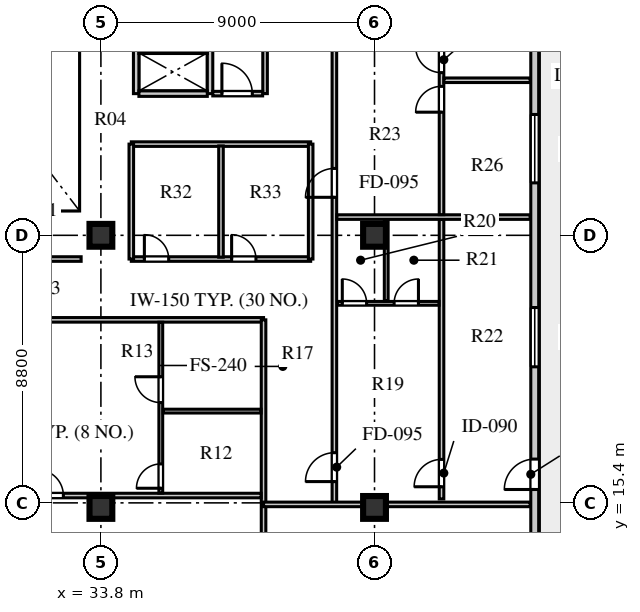
"""IFC4 building model, lengths in metres.
Left out: names, types, materials, properties, quantities, classifications, styles, units other than length and angle.
Written with IfcOpenShell. Run it as: python <this file> out.ifc"""

import sys

from ifc_helpers import new_model, si_unit, direction, frame, frame_2d, origin, origin_2d, place, context, subcontext, project, spatial, rectangle, extrude, element, fill, save


model = new_model("IFC4")
c1 = context("Model", 3, precision=1e-05, world=origin(), true_north=direction((0.0, 1.0)))
c2 = subcontext(c1, "Body", "Model", "MODEL_VIEW")
j1 = project(units=[si_unit("LENGTHUNIT", "METRE"), si_unit("PLANEANGLEUNIT", "RADIAN")], contexts=[c1])
p1 = place(None, origin())
s1 = spatial("IfcSite", under=j1, at=p1, CompositionType="ELEMENT")
p2 = place(p1, origin())
s2 = spatial("IfcBuilding", under=s1, at=p2, CompositionType="ELEMENT")
p3 = place(p2, frame((0.0, 0.0, 312.5)))
s3 = spatial("IfcBuildingStorey", under=s2, at=p3, CompositionType="ELEMENT", Elevation=312.5)
for number, where, z_axis, x_axis in (
    (1, (33.8, 15.25, 0.0), (0.0, 0.0, 1.0), (1.0, 0.0, 0.0)),
    (2, (33.8, 24.2, 0.0), (0.0, 0.0, 1.0), (1.0, 0.0, 0.0)),
    (3, (42.8, 15.25, 0.0), (0.0, 0.0, 1.0), (1.0, 0.0, 0.0)),
    (4, (42.8, 24.2, 0.0), (0.0, 0.0, 1.0), (1.0, 0.0, 0.0)),
):
    element("IfcColumn", number, at=place(p3, frame(where, z_axis=z_axis, x_axis=x_axis)), inside=s3, PredefinedType="COLUMN", context=c2, shape_type="SweptSolid", body=[
        extrude(rectangle(XDim=0.75, YDim=0.75, at=origin_2d()), origin(), (0.0, 0.0, 1.0), 3.56),
    ])
p4 = place(p3, frame((48.07, 13.41, 0.0), z_axis=(0.0, 0.0, 1.0), x_axis=(0.0, 1.0, 0.0)))
e5 = element("IfcWall", 5, at=p4, inside=s3, PredefinedType="SOLIDWALL", context=c2, shape_type="SweptSolid", body=[
    extrude(rectangle(XDim=30.38, YDim=0.26, at=frame_2d((15.19, 0.0))), origin(), (0.0, 0.0, 1.0), 3.56),
])
p5 = place(p4, frame((2.43, 0.0, 0.0)))
e6 = element("IfcOpeningElement", 6, at=p5, cuts=e5, PredefinedType="OPENING", context=c2, shape_type="SweptSolid", body=[
    extrude(rectangle(XDim=1.0, YDim=2.05, at=frame_2d((0.5, 1.025))), frame((0.0, 0.14, 0.0), z_axis=(0.0, -1.0, 0.0), x_axis=(1.0, 0.0, 0.0)), (0.0, 0.0, 1.0), 0.28),
])
p6 = place(p4, frame((6.465, 0.0, 0.8)))
e7 = element("IfcOpeningElement", 7, at=p6, cuts=e5, PredefinedType="OPENING", context=c2, shape_type="SweptSolid", body=[
    extrude(rectangle(XDim=1.95, YDim=2.0, at=frame_2d((0.975, 1.0))), frame((0.0, 0.14, 0.0), z_axis=(0.0, -1.0, 0.0), x_axis=(1.0, 0.0, 0.0)), (0.0, 0.0, 1.0), 0.28),
])
p7 = place(p4, frame((12.515, 0.0, 0.8)))
e8 = element("IfcOpeningElement", 8, at=p7, cuts=e5, PredefinedType="OPENING", context=c2, shape_type="SweptSolid", body=[
    extrude(rectangle(XDim=2.25, YDim=2.0, at=frame_2d((1.125, 1.0))), frame((0.0, 0.14, 0.0), z_axis=(0.0, -1.0, 0.0), x_axis=(1.0, 0.0, 0.0)), (0.0, 0.0, 1.0), 0.28),
])
p8 = place(p4, frame((17.24, 0.0, 0.8)))
e9 = element("IfcOpeningElement", 9, at=p8, cuts=e5, PredefinedType="OPENING", context=c2, shape_type="SweptSolid", body=[
    extrude(rectangle(XDim=1.8, YDim=2.0, at=frame_2d((0.9, 1.0))), frame((0.0, 0.14, 0.0), z_axis=(0.0, -1.0, 0.0), x_axis=(1.0, 0.0, 0.0)), (0.0, 0.0, 1.0), 0.28),
])
p9 = place(p4, frame((23.665, 0.0, 0.8)))
e10 = element("IfcOpeningElement", 10, at=p9, cuts=e5, PredefinedType="OPENING", context=c2, shape_type="SweptSolid", body=[
    extrude(rectangle(XDim=1.5, YDim=2.0, at=frame_2d((0.75, 1.0))), frame((0.0, 0.14, 0.0), z_axis=(0.0, -1.0, 0.0), x_axis=(1.0, 0.0, 0.0)), (0.0, 0.0, 1.0), 0.28),
])
p10 = place(p3, frame((34.96, 28.86, 0.0), z_axis=(0.0, 0.0, 1.0), x_axis=(0.0, 1.0, 0.0)))
e11 = element("IfcWall", 11, at=p10, inside=s3, PredefinedType="SOLIDWALL", context=c2, shape_type="SweptSolid", body=[
    extrude(rectangle(XDim=4.22, YDim=0.18, at=frame_2d((2.11, 0.0))), origin(), (0.0, 0.0, 1.0), 3.56),
])
p11 = place(p3, frame((37.39, 28.86, 0.0), z_axis=(0.0, 0.0, 1.0), x_axis=(0.0, 1.0, 0.0)))
e12 = element("IfcWall", 12, at=p11, inside=s3, PredefinedType="SOLIDWALL", context=c2, shape_type="SweptSolid", body=[
    extrude(rectangle(XDim=4.22, YDim=0.18, at=frame_2d((2.11, 0.0))), origin(), (0.0, 0.0, 1.0), 3.56),
])
p12 = place(p11, frame((2.1, 0.0, 0.0)))
e13 = element("IfcOpeningElement", 13, at=p12, cuts=e12, PredefinedType="OPENING", context=c2, shape_type="SweptSolid", body=[
    extrude(rectangle(XDim=1.2, YDim=2.12, at=frame_2d((0.6, 1.06))), frame((0.0, 0.1, 0.0), z_axis=(0.0, -1.0, 0.0), x_axis=(1.0, 0.0, 0.0)), (0.0, 0.0, 1.0), 0.2),
])
for number, where, z_axis, x_axis in (
    (14, (35.05, 28.86, 0.0), (0.0, 0.0, 1.0), (1.0, 0.0, 0.0)),
    (15, (35.05, 30.27, 0.0), (0.0, 0.0, 1.0), (1.0, 0.0, 0.0)),
):
    element("IfcWall", number, at=place(p3, frame(where, z_axis=z_axis, x_axis=x_axis)), inside=s3, PredefinedType="SOLIDWALL", context=c2, shape_type="SweptSolid", body=[
        extrude(rectangle(XDim=2.25, YDim=0.18, at=frame_2d((1.125, 0.0))), origin(), (0.0, 0.0, 1.0), 3.56),
    ])
p13 = place(p3, frame((39.2, 28.86, 0.0), z_axis=(0.0, 0.0, 1.0), x_axis=(0.0, 1.0, 0.0)))
e16 = element("IfcWall", 16, at=p13, inside=s3, PredefinedType="PARTITIONING", context=c2, shape_type="SweptSolid", body=[
    extrude(rectangle(XDim=4.22, YDim=0.15, at=frame_2d((2.11, 0.0))), origin(), (0.0, 0.0, 1.0), 3.56),
])
p14 = place(p3, frame((37.48, 28.86, 0.0), z_axis=(0.0, 0.0, 1.0), x_axis=(1.0, 0.0, 0.0)))
e17 = element("IfcWall", 17, at=p14, inside=s3, PredefinedType="PARTITIONING", context=c2, shape_type="SweptSolid", body=[
    extrude(rectangle(XDim=1.64, YDim=0.15, at=frame_2d((0.82, 0.0))), origin(), (0.0, 0.0, 1.0), 3.56),
])
p15 = place(p14, frame((0.3, 0.0, 0.0)))
e18 = element("IfcOpeningElement", 18, at=p15, cuts=e17, PredefinedType="OPENING", context=c2, shape_type="SweptSolid", body=[
    extrude(rectangle(XDim=1.0, YDim=2.1, at=frame_2d((0.5, 1.05))), frame((0.0, 0.085, 0.0), z_axis=(0.0, -1.0, 0.0), x_axis=(1.0, 0.0, 0.0)), (0.0, 0.0, 1.0), 0.17),
])
p16 = place(p3, frame((27.08, 21.42, 0.0), z_axis=(0.0, 0.0, 1.0), x_axis=(1.0, 0.0, 0.0)))
e19 = element("IfcWall", 19, at=p16, inside=s3, PredefinedType="PARTITIONING", context=c2, shape_type="SweptSolid", body=[
    extrude(rectangle(XDim=12.07, YDim=0.15, at=frame_2d((6.035, 0.0))), origin(), (0.0, 0.0, 1.0), 3.26),
])
p17 = place(p16, frame((0.63, 0.0, 0.0)))
e20 = element("IfcOpeningElement", 20, at=p17, cuts=e19, PredefinedType="OPENING", context=c2, shape_type="SweptSolid", body=[
    extrude(rectangle(XDim=0.95, YDim=2.1, at=frame_2d((0.475, 1.05))), frame((0.0, 0.085, 0.0), z_axis=(0.0, -1.0, 0.0), x_axis=(1.0, 0.0, 0.0)), (0.0, 0.0, 1.0), 0.17),
])
p18 = place(p3, frame((27.15, 23.42, 0.0), z_axis=(0.0, 0.0, 1.0), x_axis=(1.0, 0.0, 0.0)))
e21 = element("IfcWall", 21, at=p18, inside=s3, PredefinedType="PARTITIONING", context=c2, shape_type="SweptSolid", body=[
    extrude(rectangle(XDim=6.0, YDim=0.15, at=frame_2d((3.0, 0.0))), origin(), (0.0, 0.0, 1.0), 3.56),
])
p19 = place(p3, frame((39.15, 10.38, 0.0), z_axis=(0.0, 0.0, 1.0), x_axis=(0.0, 1.0, 0.0)))
e22 = element("IfcWall", 22, at=p19, inside=s3, PredefinedType="PARTITIONING", context=c2, shape_type="SweptSolid", body=[
    extrude(rectangle(XDim=11.04, YDim=0.15, at=frame_2d((5.52, 0.0))), origin(), (0.0, 0.0, 1.0), 3.56),
])
p20 = place(p3, frame((27.24, 15.641, 0.0), z_axis=(0.0, 0.0, 1.0), x_axis=(1.0, 0.0, 0.0)))
e23 = element("IfcWall", 23, at=p20, inside=s3, PredefinedType="PARTITIONING", context=c2, shape_type="SweptSolid", body=[
    extrude(rectangle(XDim=11.83, YDim=0.15, at=frame_2d((5.915, 0.0))), origin(), (0.0, 0.0, 1.0), 3.56),
])
p21 = place(p20, frame((0.3, 0.0, 0.0)))
e24 = element("IfcOpeningElement", 24, at=p21, cuts=e23, PredefinedType="OPENING", context=c2, shape_type="SweptSolid", body=[
    extrude(rectangle(XDim=0.85, YDim=2.08, at=frame_2d((0.425, 1.04))), frame((0.0, 0.085, 0.0), z_axis=(0.0, -1.0, 0.0), x_axis=(1.0, 0.0, 0.0)), (0.0, 0.0, 1.0), 0.17),
])
p22 = place(p20, frame((4.475, 0.0, 0.0)))
e25 = element("IfcOpeningElement", 25, at=p22, cuts=e23, PredefinedType="OPENING", context=c2, shape_type="SweptSolid", body=[
    extrude(rectangle(XDim=0.85, YDim=2.08, at=frame_2d((0.425, 1.04))), frame((0.0, 0.085, 0.0), z_axis=(0.0, -1.0, 0.0), x_axis=(1.0, 0.0, 0.0)), (0.0, 0.0, 1.0), 0.17),
])
p23 = place(p3, frame((35.77, 15.721, 0.0), z_axis=(0.0, 0.0, 1.0), x_axis=(0.0, 1.0, 0.0)))
e26 = element("IfcWall", 26, at=p23, inside=s3, PredefinedType="PLUMBINGWALL", context=c2, shape_type="SweptSolid", body=[
    extrude(rectangle(XDim=5.619, YDim=0.125, at=frame_2d((2.81, 0.0))), origin(), (0.0, 0.0, 1.0), 3.56),
])
p24 = place(p23, frame((0.16, 0.0, 0.0)))
e27 = element("IfcOpeningElement", 27, at=p24, cuts=e26, PredefinedType="OPENING", context=c2, shape_type="SweptSolid", body=[
    extrude(rectangle(XDim=0.8, YDim=2.05, at=frame_2d((0.4, 1.025))), frame((0.0, 0.073, 0.0), z_axis=(0.0, -1.0, 0.0), x_axis=(1.0, 0.0, 0.0)), (0.0, 0.0, 1.0), 0.145),
])
p25 = place(p23, frame((2.977, 0.0, 0.0)))
e28 = element("IfcOpeningElement", 28, at=p25, cuts=e26, PredefinedType="OPENING", context=c2, shape_type="SweptSolid", body=[
    extrude(rectangle(XDim=0.85, YDim=2.08, at=frame_2d((0.425, 1.04))), frame((0.0, 0.073, 0.0), z_axis=(0.0, -1.0, 0.0), x_axis=(1.0, 0.0, 0.0)), (0.0, 0.0, 1.0), 0.145),
])
p26 = place(p3, frame((35.85, 18.418, 0.0), z_axis=(0.0, 0.0, 1.0), x_axis=(1.0, 0.0, 0.0)))
e29 = element("IfcWall", 29, at=p26, inside=s3, PredefinedType="PLUMBINGWALL", context=c2, shape_type="SweptSolid", body=[
    extrude(rectangle(XDim=3.22, YDim=0.125, at=frame_2d((1.61, 0.0))), origin(), (0.0, 0.0, 1.0), 3.26),
])
p27 = place(p3, frame((41.48, 15.35, 0.0), z_axis=(0.0, 0.0, 1.0), x_axis=(0.0, 1.0, 0.0)))
e30 = element("IfcWall", 30, at=p27, inside=s3, PredefinedType="PARTITIONING", context=c2, shape_type="SweptSolid", body=[
    extrude(rectangle(XDim=26.5, YDim=0.15, at=frame_2d((13.25, 0.0))), origin(), (0.0, 0.0, 1.0), 3.56),
])
p28 = place(p27, frame((0.75, 0.0, 0.0)))
e31 = element("IfcOpeningElement", 31, at=p28, cuts=e30, PredefinedType="OPENING", context=c2, shape_type="SweptSolid", body=[
    extrude(rectangle(XDim=0.95, YDim=2.1, at=frame_2d((0.475, 1.05))), frame((0.0, 0.085, 0.0), z_axis=(0.0, -1.0, 0.0), x_axis=(1.0, 0.0, 0.0)), (0.0, 0.0, 1.0), 0.17),
])
p29 = place(p27, frame((10.1, 0.0, 0.0)))
e32 = element("IfcOpeningElement", 32, at=p29, cuts=e30, PredefinedType="OPENING", context=c2, shape_type="SweptSolid", body=[
    extrude(rectangle(XDim=0.95, YDim=2.1, at=frame_2d((0.475, 1.05))), frame((0.0, 0.085, 0.0), z_axis=(0.0, -1.0, 0.0), x_axis=(1.0, 0.0, 0.0)), (0.0, 0.0, 1.0), 0.17),
])
p30 = place(p27, frame((19.1, 0.0, 0.0)))
e33 = element("IfcOpeningElement", 33, at=p30, cuts=e30, PredefinedType="OPENING", context=c2, shape_type="SweptSolid", body=[
    extrude(rectangle(XDim=0.95, YDim=2.1, at=frame_2d((0.475, 1.05))), frame((0.0, 0.085, 0.0), z_axis=(0.0, -1.0, 0.0), x_axis=(1.0, 0.0, 0.0)), (0.0, 0.0, 1.0), 0.17),
])
p31 = place(p3, frame((39.15, 15.35, 0.0), z_axis=(0.0, 0.0, 1.0), x_axis=(1.0, 0.0, 0.0)))
e34 = element("IfcWall", 34, at=p31, inside=s3, PredefinedType="PARTITIONING", context=c2, shape_type="SweptSolid", body=[
    extrude(rectangle(XDim=8.77, YDim=0.15, at=frame_2d((4.385, 0.0))), origin(), (0.0, 0.0, 1.0), 2.96),
])
p32 = place(p3, frame((45.004, 15.53, 0.0), z_axis=(0.0, 0.0, 1.0), x_axis=(0.0, 1.0, 0.0)))
e35 = element("IfcWall", 35, at=p32, inside=s3, PredefinedType="PARTITIONING", context=c2, shape_type="SweptSolid", body=[
    extrude(rectangle(XDim=9.19, YDim=0.15, at=frame_2d((4.595, 0.0))), origin(), (0.0, 0.0, 1.0), 3.56),
])
p33 = place(p32, frame((0.4, 0.0, 0.0)))
e36 = element("IfcOpeningElement", 36, at=p33, cuts=e35, PredefinedType="OPENING", context=c2, shape_type="SweptSolid", body=[
    extrude(rectangle(XDim=0.9, YDim=2.08, at=frame_2d((0.45, 1.04))), frame((0.0, 0.085, 0.0), z_axis=(0.0, -1.0, 0.0), x_axis=(1.0, 0.0, 0.0)), (0.0, 0.0, 1.0), 0.17),
])
p34 = place(p3, frame((41.58, 21.963, 0.0), z_axis=(0.0, 0.0, 1.0), x_axis=(1.0, 0.0, 0.0)))
e37 = element("IfcWall", 37, at=p34, inside=s3, PredefinedType="PLUMBINGWALL", context=c2, shape_type="SweptSolid", body=[
    extrude(rectangle(XDim=3.344, YDim=0.125, at=frame_2d((1.672, 0.0))), origin(), (0.0, 0.0, 1.0), 3.56),
])
p35 = place(p34, frame((0.16, 0.0, 0.0)))
e38 = element("IfcOpeningElement", 38, at=p35, cuts=e37, PredefinedType="OPENING", context=c2, shape_type="SweptSolid", body=[
    extrude(rectangle(XDim=0.8, YDim=2.05, at=frame_2d((0.4, 1.025))), frame((0.0, 0.073, 0.0), z_axis=(0.0, -1.0, 0.0), x_axis=(1.0, 0.0, 0.0)), (0.0, 0.0, 1.0), 0.145),
])
p36 = place(p34, frame((1.865, 0.0, 0.0)))
e39 = element("IfcOpeningElement", 39, at=p36, cuts=e37, PredefinedType="OPENING", context=c2, shape_type="SweptSolid", body=[
    extrude(rectangle(XDim=0.8, YDim=2.05, at=frame_2d((0.4, 1.025))), frame((0.0, 0.073, 0.0), z_axis=(0.0, -1.0, 0.0), x_axis=(1.0, 0.0, 0.0)), (0.0, 0.0, 1.0), 0.145),
])
p37 = place(p3, frame((43.185, 22.043, 0.0), z_axis=(0.0, 0.0, 1.0), x_axis=(0.0, 1.0, 0.0)))
e40 = element("IfcWall", 40, at=p37, inside=s3, PredefinedType="PLUMBINGWALL", context=c2, shape_type="SweptSolid", body=[
    extrude(rectangle(XDim=2.677, YDim=0.125, at=frame_2d((1.338, 0.0))), origin(), (0.0, 0.0, 1.0), 3.56),
])
p38 = place(p3, frame((41.56, 24.8, 0.0), z_axis=(0.0, 0.0, 1.0), x_axis=(1.0, 0.0, 0.0)))
e41 = element("IfcWall", 41, at=p38, inside=s3, PredefinedType="PARTITIONING", context=c2, shape_type="SweptSolid", body=[
    extrude(rectangle(XDim=6.36, YDim=0.15, at=frame_2d((3.18, 0.0))), origin(), (0.0, 0.0, 1.0), 3.56),
])
p39 = place(p3, frame((45.004, 24.88, 0.0), z_axis=(0.0, 0.0, 1.0), x_axis=(0.0, 1.0, 0.0)))
e42 = element("IfcWall", 42, at=p39, inside=s3, PredefinedType="PARTITIONING", context=c2, shape_type="SweptSolid", body=[
    extrude(rectangle(XDim=8.84, YDim=0.15, at=frame_2d((4.42, 0.0))), origin(), (0.0, 0.0, 1.0), 3.56),
])
p40 = place(p39, frame((3.37, 0.0, 0.0)))
e43 = element("IfcOpeningElement", 43, at=p40, cuts=e42, PredefinedType="OPENING", context=c2, shape_type="SweptSolid", body=[
    extrude(rectangle(XDim=0.85, YDim=2.08, at=frame_2d((0.425, 1.04))), frame((0.0, 0.085, 0.0), z_axis=(0.0, -1.0, 0.0), x_axis=(1.0, 0.0, 0.0)), (0.0, 0.0, 1.0), 0.17),
])
p41 = place(p39, frame((4.67, 0.0, 0.0)))
e44 = element("IfcOpeningElement", 44, at=p41, cuts=e42, PredefinedType="OPENING", context=c2, shape_type="SweptSolid", body=[
    extrude(rectangle(XDim=0.85, YDim=2.08, at=frame_2d((0.425, 1.04))), frame((0.0, 0.085, 0.0), z_axis=(0.0, -1.0, 0.0), x_axis=(1.0, 0.0, 0.0)), (0.0, 0.0, 1.0), 0.17),
])
p42 = place(p3, frame((45.084, 29.3, 0.0), z_axis=(0.0, 0.0, 1.0), x_axis=(1.0, 0.0, 0.0)))
e45 = element("IfcWall", 45, at=p42, inside=s3, PredefinedType="PARTITIONING", context=c2, shape_type="SweptSolid", body=[
    extrude(rectangle(XDim=2.836, YDim=0.15, at=frame_2d((1.418, 0.0))), origin(), (0.0, 0.0, 1.0), 3.56),
])
p43 = place(p3, frame((34.8, 23.42, 0.0), z_axis=(0.0, 0.0, 1.0), x_axis=(1.0, 0.0, 0.0)))
e46 = element("IfcWall", 46, at=p43, inside=s3, PredefinedType="PARTITIONING", context=c2, shape_type="SweptSolid", body=[
    extrude(rectangle(XDim=5.9, YDim=0.15, at=frame_2d((2.95, 0.0))), origin(), (0.0, 0.0, 1.0), 3.56),
])
p44 = place(p43, frame((0.43, 0.0, 0.0)))
e47 = element("IfcOpeningElement", 47, at=p44, cuts=e46, PredefinedType="OPENING", context=c2, shape_type="SweptSolid", body=[
    extrude(rectangle(XDim=0.8, YDim=2.05, at=frame_2d((0.4, 1.025))), frame((0.0, 0.085, 0.0), z_axis=(0.0, -1.0, 0.0), x_axis=(1.0, 0.0, 0.0)), (0.0, 0.0, 1.0), 0.17),
])
p45 = place(p43, frame((3.3, 0.0, 0.0)))
e48 = element("IfcOpeningElement", 48, at=p45, cuts=e46, PredefinedType="OPENING", context=c2, shape_type="SweptSolid", body=[
    extrude(rectangle(XDim=0.8, YDim=2.05, at=frame_2d((0.4, 1.025))), frame((0.0, 0.085, 0.0), z_axis=(0.0, -1.0, 0.0), x_axis=(1.0, 0.0, 0.0)), (0.0, 0.0, 1.0), 0.17),
])
p46 = place(p3, frame((34.8, 27.2, 0.0), z_axis=(0.0, 0.0, 1.0), x_axis=(1.0, 0.0, 0.0)))
e49 = element("IfcWall", 49, at=p46, inside=s3, PredefinedType="PARTITIONING", context=c2, shape_type="SweptSolid", body=[
    extrude(rectangle(XDim=5.9, YDim=0.15, at=frame_2d((2.95, 0.0))), origin(), (0.0, 0.0, 1.0), 3.26),
])
for number, where, z_axis, x_axis in (
    (50, (34.8, 23.42, 0.0), (0.0, 0.0, 1.0), (0.0, 1.0, 0.0)),
    (51, (40.7, 23.42, 0.0), (0.0, 0.0, 1.0), (0.0, 1.0, 0.0)),
):
    element("IfcWall", number, at=place(p3, frame(where, z_axis=z_axis, x_axis=x_axis)), inside=s3, PredefinedType="PARTITIONING", context=c2, shape_type="SweptSolid", body=[
        extrude(rectangle(XDim=3.78, YDim=0.15, at=frame_2d((1.89, 0.0))), origin(), (0.0, 0.0, 1.0), 3.56),
    ])
p47 = place(p3, frame((37.75, 23.48, 0.0), z_axis=(0.0, 0.0, 1.0), x_axis=(0.0, 1.0, 0.0)))
e52 = element("IfcWall", 52, at=p47, inside=s3, PredefinedType="PARTITIONING", context=c2, shape_type="SweptSolid", body=[
    extrude(rectangle(XDim=3.66, YDim=0.15, at=frame_2d((1.83, 0.0))), origin(), (0.0, 0.0, 1.0), 3.56),
])
p48 = place(p5, frame((1.0, 0.0, 0.0), z_axis=(0.0, 0.0, 1.0), x_axis=(-1.0, 0.0, 0.0)))
e53 = element("IfcDoor", 53, at=p48, inside=s3, OperationType="SINGLE_SWING_RIGHT", PredefinedType="DOOR", context=c2, shape_type="SweptSolid", body=[
    extrude(rectangle(XDim=1.0, YDim=2.05, at=frame_2d((0.5, 1.025))), frame((0.0, 0.025, 0.0), z_axis=(0.0, -1.0, 0.0), x_axis=(1.0, 0.0, 0.0)), (0.0, 0.0, 1.0), 0.05),
])
fill(e6, e53)
p49 = place(p6, origin())
e54 = element("IfcWindow", 54, at=p49, inside=s3, PartitioningType="SINGLE_PANEL", PredefinedType="WINDOW", context=c2, shape_type="SweptSolid", body=[
    extrude(rectangle(XDim=1.95, YDim=2.0, at=frame_2d((0.975, 1.0))), frame((0.0, 0.03, 0.0), z_axis=(0.0, -1.0, 0.0), x_axis=(1.0, 0.0, 0.0)), (0.0, 0.0, 1.0), 0.06),
])
fill(e7, e54)
p50 = place(p7, origin())
e55 = element("IfcWindow", 55, at=p50, inside=s3, PartitioningType="SINGLE_PANEL", PredefinedType="WINDOW", context=c2, shape_type="SweptSolid", body=[
    extrude(rectangle(XDim=2.25, YDim=2.0, at=frame_2d((1.125, 1.0))), frame((0.0, 0.03, 0.0), z_axis=(0.0, -1.0, 0.0), x_axis=(1.0, 0.0, 0.0)), (0.0, 0.0, 1.0), 0.06),
])
fill(e8, e55)
p51 = place(p15, origin())
e56 = element("IfcDoor", 56, at=p51, inside=s3, OperationType="SINGLE_SWING_LEFT", PredefinedType="DOOR", context=c2, shape_type="SweptSolid", body=[
    extrude(rectangle(XDim=1.0, YDim=2.1, at=frame_2d((0.5, 1.05))), frame((0.0, 0.025, 0.0), z_axis=(0.0, -1.0, 0.0), x_axis=(1.0, 0.0, 0.0)), (0.0, 0.0, 1.0), 0.05),
])
fill(e18, e56)
p52 = place(p24, origin())
e57 = element("IfcDoor", 57, at=p52, inside=s3, OperationType="SINGLE_SWING_LEFT", PredefinedType="DOOR", context=c2, shape_type="SweptSolid", body=[
    extrude(rectangle(XDim=0.8, YDim=2.05, at=frame_2d((0.4, 1.025))), frame((0.0, 0.025, 0.0), z_axis=(0.0, -1.0, 0.0), x_axis=(1.0, 0.0, 0.0)), (0.0, 0.0, 1.0), 0.05),
])
fill(e27, e57)
p53 = place(p25, origin())
e58 = element("IfcDoor", 58, at=p53, inside=s3, OperationType="SINGLE_SWING_RIGHT", PredefinedType="DOOR", context=c2, shape_type="SweptSolid", body=[
    extrude(rectangle(XDim=0.85, YDim=2.08, at=frame_2d((0.425, 1.04))), frame((0.0, 0.025, 0.0), z_axis=(0.0, -1.0, 0.0), x_axis=(1.0, 0.0, 0.0)), (0.0, 0.0, 1.0), 0.05),
])
fill(e28, e58)
p54 = place(p22, frame((0.85, 0.0, 0.0), z_axis=(0.0, 0.0, 1.0), x_axis=(-1.0, 0.0, 0.0)))
e59 = element("IfcDoor", 59, at=p54, inside=s3, OperationType="SINGLE_SWING_RIGHT", PredefinedType="DOOR", context=c2, shape_type="SweptSolid", body=[
    extrude(rectangle(XDim=0.85, YDim=2.08, at=frame_2d((0.425, 1.04))), frame((0.0, 0.025, 0.0), z_axis=(0.0, -1.0, 0.0), x_axis=(1.0, 0.0, 0.0)), (0.0, 0.0, 1.0), 0.05),
])
fill(e25, e59)
p55 = place(p35, origin())
e60 = element("IfcDoor", 60, at=p55, inside=s3, OperationType="SINGLE_SWING_LEFT", PredefinedType="DOOR", context=c2, shape_type="SweptSolid", body=[
    extrude(rectangle(XDim=0.8, YDim=2.05, at=frame_2d((0.4, 1.025))), frame((0.0, 0.025, 0.0), z_axis=(0.0, -1.0, 0.0), x_axis=(1.0, 0.0, 0.0)), (0.0, 0.0, 1.0), 0.05),
])
fill(e38, e60)
p56 = place(p36, origin())
e61 = element("IfcDoor", 61, at=p56, inside=s3, OperationType="SINGLE_SWING_RIGHT", PredefinedType="DOOR", context=c2, shape_type="SweptSolid", body=[
    extrude(rectangle(XDim=0.8, YDim=2.05, at=frame_2d((0.4, 1.025))), frame((0.0, 0.025, 0.0), z_axis=(0.0, -1.0, 0.0), x_axis=(1.0, 0.0, 0.0)), (0.0, 0.0, 1.0), 0.05),
])
fill(e39, e61)
p57 = place(p33, origin())
e62 = element("IfcDoor", 62, at=p57, inside=s3, OperationType="SINGLE_SWING_LEFT", PredefinedType="DOOR", context=c2, shape_type="SweptSolid", body=[
    extrude(rectangle(XDim=0.9, YDim=2.08, at=frame_2d((0.45, 1.04))), frame((0.0, 0.025, 0.0), z_axis=(0.0, -1.0, 0.0), x_axis=(1.0, 0.0, 0.0)), (0.0, 0.0, 1.0), 0.05),
])
fill(e36, e62)
p58 = place(p28, origin())
e63 = element("IfcDoor", 63, at=p58, inside=s3, OperationType="SINGLE_SWING_LEFT", PredefinedType="DOOR", context=c2, shape_type="SweptSolid", body=[
    extrude(rectangle(XDim=0.95, YDim=2.1, at=frame_2d((0.475, 1.05))), frame((0.0, 0.025, 0.0), z_axis=(0.0, -1.0, 0.0), x_axis=(1.0, 0.0, 0.0)), (0.0, 0.0, 1.0), 0.05),
])
fill(e31, e63)
p59 = place(p40, origin())
e64 = element("IfcDoor", 64, at=p59, inside=s3, OperationType="SINGLE_SWING_LEFT", PredefinedType="DOOR", context=c2, shape_type="SweptSolid", body=[
    extrude(rectangle(XDim=0.85, YDim=2.08, at=frame_2d((0.425, 1.04))), frame((0.0, 0.025, 0.0), z_axis=(0.0, -1.0, 0.0), x_axis=(1.0, 0.0, 0.0)), (0.0, 0.0, 1.0), 0.05),
])
fill(e43, e64)
p60 = place(p41, origin())
e65 = element("IfcDoor", 65, at=p60, inside=s3, OperationType="SINGLE_SWING_RIGHT", PredefinedType="DOOR", context=c2, shape_type="SweptSolid", body=[
    extrude(rectangle(XDim=0.85, YDim=2.08, at=frame_2d((0.425, 1.04))), frame((0.0, 0.025, 0.0), z_axis=(0.0, -1.0, 0.0), x_axis=(1.0, 0.0, 0.0)), (0.0, 0.0, 1.0), 0.05),
])
fill(e44, e65)
p61 = place(p29, origin())
e66 = element("IfcDoor", 66, at=p61, inside=s3, OperationType="SINGLE_SWING_LEFT", PredefinedType="DOOR", context=c2, shape_type="SweptSolid", body=[
    extrude(rectangle(XDim=0.95, YDim=2.1, at=frame_2d((0.475, 1.05))), frame((0.0, 0.025, 0.0), z_axis=(0.0, -1.0, 0.0), x_axis=(1.0, 0.0, 0.0)), (0.0, 0.0, 1.0), 0.05),
])
fill(e32, e66)
p62 = place(p44, origin())
e67 = element("IfcDoor", 67, at=p62, inside=s3, OperationType="SINGLE_SWING_LEFT", PredefinedType="DOOR", context=c2, shape_type="SweptSolid", body=[
    extrude(rectangle(XDim=0.8, YDim=2.05, at=frame_2d((0.4, 1.025))), frame((0.0, 0.025, 0.0), z_axis=(0.0, -1.0, 0.0), x_axis=(1.0, 0.0, 0.0)), (0.0, 0.0, 1.0), 0.05),
])
fill(e47, e67)
p63 = place(p45, origin())
e68 = element("IfcDoor", 68, at=p63, inside=s3, OperationType="SINGLE_SWING_LEFT", PredefinedType="DOOR", context=c2, shape_type="SweptSolid", body=[
    extrude(rectangle(XDim=0.8, YDim=2.05, at=frame_2d((0.4, 1.025))), frame((0.0, 0.025, 0.0), z_axis=(0.0, -1.0, 0.0), x_axis=(1.0, 0.0, 0.0)), (0.0, 0.0, 1.0), 0.05),
])
fill(e48, e68)
save(model, sys.argv[1])
